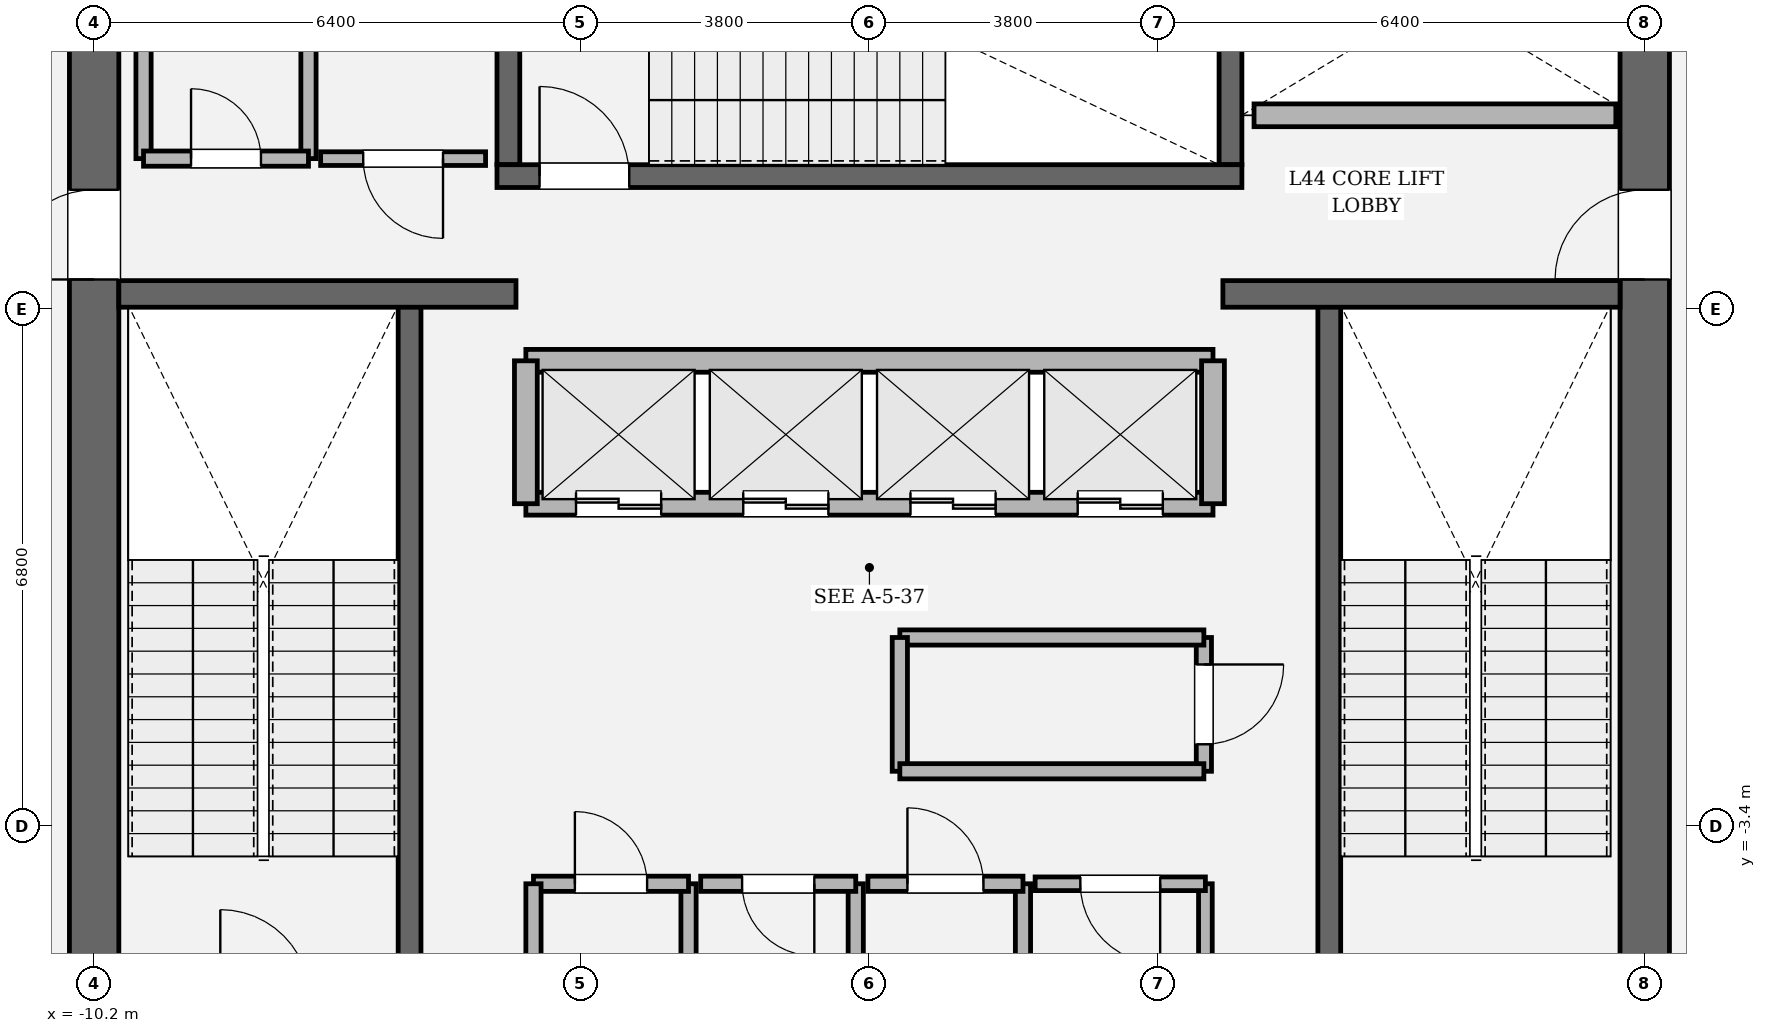
"""IFC4 building model, lengths in metres.
Left out: names, types, materials, properties, quantities, classifications, styles, units other than length and angle.
Written with IfcOpenShell. Run it as: python <this file> out.ifc"""

import sys

from ifc_helpers import new_model, si_unit, direction, frame, frame_2d, origin, place, context, subcontext, project, spatial, rectangle, extrude, element, fill, save


model = new_model("IFC4")
c1 = context("Model", 3, precision=1e-05, world=origin(), true_north=direction((0.0, 1.0)))
c2 = subcontext(c1, "Body", "Model", "MODEL_VIEW")
j1 = project(units=[si_unit("LENGTHUNIT", "METRE"), si_unit("PLANEANGLEUNIT", "RADIAN")], contexts=[c1])
p1 = place(None, origin())
s1 = spatial("IfcSite", under=j1, at=p1, CompositionType="ELEMENT")
p2 = place(p1, origin())
s2 = spatial("IfcBuilding", under=s1, at=p2, CompositionType="ELEMENT")
p3 = place(p2, frame((0.0, 0.0, 188.4)))
s3 = spatial("IfcBuildingStorey", under=s2, at=p3, CompositionType="ELEMENT", Elevation=188.4)
p4 = place(p3, frame((-10.2, -8.875, 0.0), z_axis=(0.0, 0.0, 1.0), x_axis=(0.0, 1.0, 0.0)))
e1 = element("IfcWall", 1, at=p4, inside=s3, PredefinedType="SHEAR", context=c2, shape_type="SweptSolid", body=[
    extrude(rectangle(XDim=17.75, YDim=0.65, at=frame_2d((8.875, 0.0))), origin(), (0.0, 0.0, 1.0), 4.05),
])
p5 = place(p4, frame((12.665, 0.0, 0.0)))
e2 = element("IfcOpeningElement", 2, at=p5, cuts=e1, PredefinedType="OPENING", context=c2, shape_type="SweptSolid", body=[
    extrude(rectangle(XDim=1.18, YDim=2.2, at=frame_2d((0.59, 1.1))), frame((0.0, 0.335, 0.0), z_axis=(0.0, -1.0, 0.0), x_axis=(1.0, 0.0, 0.0)), (0.0, 0.0, 1.0), 0.67),
])
p6 = place(p3, frame((10.2, 8.875, 0.0), z_axis=(0.0, 0.0, 1.0), x_axis=(0.0, -1.0, 0.0)))
e3 = element("IfcWall", 3, at=p6, inside=s3, PredefinedType="SHEAR", context=c2, shape_type="SweptSolid", body=[
    extrude(rectangle(XDim=17.75, YDim=0.65, at=frame_2d((8.875, 0.0))), origin(), (0.0, 0.0, 1.0), 4.05),
])
p7 = place(p6, frame((3.905, 0.0, 0.0)))
e4 = element("IfcOpeningElement", 4, at=p7, cuts=e3, PredefinedType="OPENING", context=c2, shape_type="SweptSolid", body=[
    extrude(rectangle(XDim=1.18, YDim=2.2, at=frame_2d((0.59, 1.1))), frame((0.0, 0.335, 0.0), z_axis=(0.0, -1.0, 0.0), x_axis=(1.0, 0.0, 0.0)), (0.0, 0.0, 1.0), 0.67),
])
for number, where, z_axis, x_axis in (
    (5, (-6.05, -5.5, 0.0), (0.0, 0.0, 1.0), (0.0, 1.0, 0.0)),
    (6, (6.05, 3.45, 0.0), (0.0, 0.0, 1.0), (0.0, -1.0, 0.0)),
):
    element("IfcWall", number, at=place(p3, frame(where, z_axis=z_axis, x_axis=x_axis)), inside=s3, PredefinedType="SOLIDWALL", context=c2, shape_type="SweptSolid", body=[
        extrude(rectangle(XDim=8.95, YDim=0.3, at=frame_2d((4.475, 0.0))), origin(), (0.0, 0.0, 1.0), 4.05),
    ])
for number, where, z_axis, x_axis in (
    (7, (-4.75, 5.3, 0.0), (0.0, 0.0, 1.0), (0.0, 1.0, 0.0)),
    (8, (4.75, 8.875, 0.0), (0.0, 0.0, 1.0), (0.0, -1.0, 0.0)),
):
    element("IfcWall", number, at=place(p3, frame(where, z_axis=z_axis, x_axis=x_axis)), inside=s3, PredefinedType="SOLIDWALL", context=c2, shape_type="SweptSolid", body=[
        extrude(rectangle(XDim=3.575, YDim=0.3, at=frame_2d((1.788, 0.0))), origin(), (0.0, 0.0, 1.0), 4.05),
    ])
p8 = place(p3, frame((-4.9, 5.15, 0.0), z_axis=(0.0, 0.0, 1.0), x_axis=(1.0, 0.0, 0.0)))
e9 = element("IfcWall", 9, at=p8, inside=s3, PredefinedType="SOLIDWALL", context=c2, shape_type="SweptSolid", body=[
    extrude(rectangle(XDim=9.8, YDim=0.3, at=frame_2d((4.9, 0.0))), origin(), (0.0, 0.0, 1.0), 4.05),
])
p9 = place(p8, frame((0.56, 0.0, 0.0)))
e10 = element("IfcOpeningElement", 10, at=p9, cuts=e9, PredefinedType="OPENING", context=c2, shape_type="SweptSolid", body=[
    extrude(rectangle(XDim=1.18, YDim=2.2, at=frame_2d((0.59, 1.1))), frame((0.0, 0.16, 0.0), z_axis=(0.0, -1.0, 0.0), x_axis=(1.0, 0.0, 0.0)), (0.0, 0.0, 1.0), 0.32),
])
for number, where, z_axis, x_axis in (
    (11, (-9.875, 3.6, 0.0), (0.0, 0.0, 1.0), (1.0, 0.0, 0.0)),
    (12, (4.65, 3.6, 0.0), (0.0, 0.0, 1.0), (1.0, 0.0, 0.0)),
):
    element("IfcWall", number, at=place(p3, frame(where, z_axis=z_axis, x_axis=x_axis)), inside=s3, PredefinedType="SOLIDWALL", context=c2, shape_type="SweptSolid", body=[
        extrude(rectangle(XDim=5.225, YDim=0.35, at=frame_2d((2.613, 0.0))), origin(), (0.0, 0.0, 1.0), 4.05),
    ])
p10 = place(p3, frame((-4.52, 0.84, 0.0), z_axis=(0.0, 0.0, 1.0), x_axis=(1.0, 0.0, 0.0)))
e13 = element("IfcWall", 13, at=p10, inside=s3, PredefinedType="SOLIDWALL", context=c2, shape_type="SweptSolid", body=[
    extrude(rectangle(XDim=9.04, YDim=0.3, at=frame_2d((4.52, 0.0))), origin(), (0.0, 0.0, 1.0), 3.83),
])
p11 = place(p10, frame((0.66, 0.0, 0.0)))
e14 = element("IfcOpeningElement", 14, at=p11, cuts=e13, PredefinedType="OPENING", context=c2, shape_type="SweptSolid", body=[
    extrude(rectangle(XDim=1.12, YDim=2.25, at=frame_2d((0.56, 1.125))), frame((0.0, 0.16, 0.0), z_axis=(0.0, -1.0, 0.0), x_axis=(1.0, 0.0, 0.0)), (0.0, 0.0, 1.0), 0.32),
])
p12 = place(p10, frame((2.86, 0.0, 0.0)))
e15 = element("IfcOpeningElement", 15, at=p12, cuts=e13, PredefinedType="OPENING", context=c2, shape_type="SweptSolid", body=[
    extrude(rectangle(XDim=1.12, YDim=2.25, at=frame_2d((0.56, 1.125))), frame((0.0, 0.16, 0.0), z_axis=(0.0, -1.0, 0.0), x_axis=(1.0, 0.0, 0.0)), (0.0, 0.0, 1.0), 0.32),
])
p13 = place(p10, frame((5.06, 0.0, 0.0)))
e16 = element("IfcOpeningElement", 16, at=p13, cuts=e13, PredefinedType="OPENING", context=c2, shape_type="SweptSolid", body=[
    extrude(rectangle(XDim=1.12, YDim=2.25, at=frame_2d((0.56, 1.125))), frame((0.0, 0.16, 0.0), z_axis=(0.0, -1.0, 0.0), x_axis=(1.0, 0.0, 0.0)), (0.0, 0.0, 1.0), 0.32),
])
p14 = place(p10, frame((7.26, 0.0, 0.0)))
e17 = element("IfcOpeningElement", 17, at=p14, cuts=e13, PredefinedType="OPENING", context=c2, shape_type="SweptSolid", body=[
    extrude(rectangle(XDim=1.12, YDim=2.25, at=frame_2d((0.56, 1.125))), frame((0.0, 0.16, 0.0), z_axis=(0.0, -1.0, 0.0), x_axis=(1.0, 0.0, 0.0)), (0.0, 0.0, 1.0), 0.32),
])
p15 = place(p3, frame((-4.52, 2.72, 0.0), z_axis=(0.0, 0.0, 1.0), x_axis=(1.0, 0.0, 0.0)))
e18 = element("IfcWall", 18, at=p15, inside=s3, PredefinedType="SOLIDWALL", context=c2, shape_type="SweptSolid", body=[
    extrude(rectangle(XDim=9.04, YDim=0.3, at=frame_2d((4.52, 0.0))), origin(), (0.0, 0.0, 1.0), 3.83),
])
for number, where, z_axis, x_axis in (
    (19, (-4.52, 0.84, 0.0), (0.0, 0.0, 1.0), (0.0, 1.0, 0.0)),
    (20, (4.52, 0.84, 0.0), (0.0, 0.0, 1.0), (0.0, 1.0, 0.0)),
):
    element("IfcWall", number, at=place(p3, frame(where, z_axis=z_axis, x_axis=x_axis)), inside=s3, PredefinedType="SOLIDWALL", context=c2, shape_type="SweptSolid", body=[
        extrude(rectangle(XDim=1.88, YDim=0.3, at=frame_2d((0.94, 0.0))), origin(), (0.0, 0.0, 1.0), 3.83),
    ])
p16 = place(p3, frame((5.06, 5.95, 0.0), z_axis=(0.0, 0.0, 1.0), x_axis=(1.0, 0.0, 0.0)))
e21 = element("IfcWall", 21, at=p16, inside=s3, PredefinedType="SOLIDWALL", context=c2, shape_type="SweptSolid", body=[
    extrude(rectangle(XDim=4.76, YDim=0.3, at=frame_2d((2.38, 0.0))), origin(), (0.0, 0.0, 1.0), 3.83),
])
p17 = place(p3, frame((-2.38, -5.9, 0.0), z_axis=(0.0, 0.0, 1.0), x_axis=(0.0, 1.0, 0.0)))
e22 = element("IfcWall", 22, at=p17, inside=s3, PredefinedType="SOLIDWALL", context=c2, shape_type="SweptSolid", body=[
    extrude(rectangle(XDim=1.74, YDim=0.2, at=frame_2d((0.87, 0.0))), origin(), (0.0, 0.0, 1.0), 3.83),
])
p18 = place(p3, frame((-2.38, -4.16, 0.0), z_axis=(0.0, 0.0, 1.0), x_axis=(-1.0, 0.0, 0.0)))
e23 = element("IfcWall", 23, at=p18, inside=s3, PredefinedType="SOLIDWALL", context=c2, shape_type="SweptSolid", body=[
    extrude(rectangle(XDim=2.04, YDim=0.2, at=frame_2d((1.02, 0.0))), origin(), (0.0, 0.0, 1.0), 3.83),
])
p19 = place(p18, frame((0.545, 0.0, 0.0)))
e24 = element("IfcOpeningElement", 24, at=p19, cuts=e23, PredefinedType="OPENING", context=c2, shape_type="SweptSolid", body=[
    extrude(rectangle(XDim=0.95, YDim=2.15, at=frame_2d((0.475, 1.075))), frame((0.0, 0.11, 0.0), z_axis=(0.0, -1.0, 0.0), x_axis=(1.0, 0.0, 0.0)), (0.0, 0.0, 1.0), 0.22),
])
for number, where, z_axis, x_axis in (
    (25, (-4.42, -4.16, 0.0), (0.0, 0.0, 1.0), (0.0, -1.0, 0.0)),
    (26, (-0.18, -5.9, 0.0), (0.0, 0.0, 1.0), (0.0, 1.0, 0.0)),
):
    element("IfcWall", number, at=place(p3, frame(where, z_axis=z_axis, x_axis=x_axis)), inside=s3, PredefinedType="SOLIDWALL", context=c2, shape_type="SweptSolid", body=[
        extrude(rectangle(XDim=1.74, YDim=0.2, at=frame_2d((0.87, 0.0))), origin(), (0.0, 0.0, 1.0), 3.83),
    ])
p20 = place(p3, frame((-0.18, -4.16, 0.0), z_axis=(0.0, 0.0, 1.0), x_axis=(-1.0, 0.0, 0.0)))
e27 = element("IfcWall", 27, at=p20, inside=s3, PredefinedType="SOLIDWALL", context=c2, shape_type="SweptSolid", body=[
    extrude(rectangle(XDim=2.04, YDim=0.2, at=frame_2d((1.02, 0.0))), origin(), (0.0, 0.0, 1.0), 3.83),
])
p21 = place(p20, frame((0.545, 0.0, 0.0)))
e28 = element("IfcOpeningElement", 28, at=p21, cuts=e27, PredefinedType="OPENING", context=c2, shape_type="SweptSolid", body=[
    extrude(rectangle(XDim=0.95, YDim=2.15, at=frame_2d((0.475, 1.075))), frame((0.0, 0.11, 0.0), z_axis=(0.0, -1.0, 0.0), x_axis=(1.0, 0.0, 0.0)), (0.0, 0.0, 1.0), 0.22),
])
p22 = place(p3, frame((2.02, -5.9, 0.0), z_axis=(0.0, 0.0, 1.0), x_axis=(0.0, 1.0, 0.0)))
e29 = element("IfcWall", 29, at=p22, inside=s3, PredefinedType="SOLIDWALL", context=c2, shape_type="SweptSolid", body=[
    extrude(rectangle(XDim=1.74, YDim=0.2, at=frame_2d((0.87, 0.0))), origin(), (0.0, 0.0, 1.0), 3.83),
])
p23 = place(p3, frame((2.02, -4.16, 0.0), z_axis=(0.0, 0.0, 1.0), x_axis=(-1.0, 0.0, 0.0)))
e30 = element("IfcWall", 30, at=p23, inside=s3, PredefinedType="SOLIDWALL", context=c2, shape_type="SweptSolid", body=[
    extrude(rectangle(XDim=2.04, YDim=0.2, at=frame_2d((1.02, 0.0))), origin(), (0.0, 0.0, 1.0), 3.83),
])
p24 = place(p23, frame((0.52, 0.0, 0.0)))
e31 = element("IfcOpeningElement", 31, at=p24, cuts=e30, PredefinedType="OPENING", context=c2, shape_type="SweptSolid", body=[
    extrude(rectangle(XDim=1.0, YDim=2.15, at=frame_2d((0.5, 1.075))), frame((0.0, 0.11, 0.0), z_axis=(0.0, -1.0, 0.0), x_axis=(1.0, 0.0, 0.0)), (0.0, 0.0, 1.0), 0.22),
])
p25 = place(p3, frame((4.42, -5.9, 0.0), z_axis=(0.0, 0.0, 1.0), x_axis=(0.0, 1.0, 0.0)))
e32 = element("IfcWall", 32, at=p25, inside=s3, PredefinedType="PARTITIONING", context=c2, shape_type="SweptSolid", body=[
    extrude(rectangle(XDim=1.74, YDim=0.18, at=frame_2d((0.87, 0.0))), origin(), (0.0, 0.0, 1.0), 3.83),
])
p26 = place(p3, frame((4.42, -4.16, 0.0), z_axis=(0.0, 0.0, 1.0), x_axis=(-1.0, 0.0, 0.0)))
e33 = element("IfcWall", 33, at=p26, inside=s3, PredefinedType="PARTITIONING", context=c2, shape_type="SweptSolid", body=[
    extrude(rectangle(XDim=2.24, YDim=0.18, at=frame_2d((1.12, 0.0))), origin(), (0.0, 0.0, 1.0), 3.83),
])
p27 = place(p26, frame((0.595, 0.0, 0.0)))
e34 = element("IfcOpeningElement", 34, at=p27, cuts=e33, PredefinedType="OPENING", context=c2, shape_type="SweptSolid", body=[
    extrude(rectangle(XDim=1.05, YDim=2.2, at=frame_2d((0.525, 1.1))), frame((0.0, 0.1, 0.0), z_axis=(0.0, -1.0, 0.0), x_axis=(1.0, 0.0, 0.0)), (0.0, 0.0, 1.0), 0.2),
])
p28 = place(p3, frame((4.4, -2.68, 0.0), z_axis=(0.0, 0.0, 1.0), x_axis=(0.0, 1.0, 0.0)))
e35 = element("IfcWall", 35, at=p28, inside=s3, PredefinedType="SOLIDWALL", context=c2, shape_type="SweptSolid", body=[
    extrude(rectangle(XDim=1.76, YDim=0.2, at=frame_2d((0.88, 0.0))), origin(), (0.0, 0.0, 1.0), 3.83),
])
p29 = place(p28, frame((0.355, 0.0, 0.0)))
e36 = element("IfcOpeningElement", 36, at=p29, cuts=e35, PredefinedType="OPENING", context=c2, shape_type="SweptSolid", body=[
    extrude(rectangle(XDim=1.05, YDim=2.2, at=frame_2d((0.525, 1.1))), frame((0.0, 0.11, 0.0), z_axis=(0.0, -1.0, 0.0), x_axis=(1.0, 0.0, 0.0)), (0.0, 0.0, 1.0), 0.22),
])
p30 = place(p3, frame((4.4, -0.92, 0.0), z_axis=(0.0, 0.0, 1.0), x_axis=(-1.0, 0.0, 0.0)))
e37 = element("IfcWall", 37, at=p30, inside=s3, PredefinedType="SOLIDWALL", context=c2, shape_type="SweptSolid", body=[
    extrude(rectangle(XDim=4.0, YDim=0.2, at=frame_2d((2.0, 0.0))), origin(), (0.0, 0.0, 1.0), 3.83),
])
p31 = place(p3, frame((0.4, -0.92, 0.0), z_axis=(0.0, 0.0, 1.0), x_axis=(0.0, -1.0, 0.0)))
e38 = element("IfcWall", 38, at=p31, inside=s3, PredefinedType="SOLIDWALL", context=c2, shape_type="SweptSolid", body=[
    extrude(rectangle(XDim=1.76, YDim=0.2, at=frame_2d((0.88, 0.0))), origin(), (0.0, 0.0, 1.0), 3.83),
])
p32 = place(p3, frame((0.4, -2.68, 0.0), z_axis=(0.0, 0.0, 1.0), x_axis=(1.0, 0.0, 0.0)))
e39 = element("IfcWall", 39, at=p32, inside=s3, PredefinedType="SOLIDWALL", context=c2, shape_type="SweptSolid", body=[
    extrude(rectangle(XDim=4.0, YDim=0.2, at=frame_2d((2.0, 0.0))), origin(), (0.0, 0.0, 1.0), 3.83),
])
for number, where, z_axis, x_axis in (
    (40, (-7.38, 5.38, 0.0), (0.0, 0.0, 1.0), (0.0, 1.0, 0.0)),
    (41, (-9.55, 8.65, 0.0), (0.0, 0.0, 1.0), (0.0, -1.0, 0.0)),
):
    element("IfcWall", number, at=place(p3, frame(where, z_axis=z_axis, x_axis=x_axis)), inside=s3, PredefinedType="SOLIDWALL", context=c2, shape_type="SweptSolid", body=[
        extrude(rectangle(XDim=3.27, YDim=0.2, at=frame_2d((1.635, 0.0))), origin(), (0.0, 0.0, 1.0), 3.83),
    ])
p33 = place(p3, frame((-9.55, 5.38, 0.0), z_axis=(0.0, 0.0, 1.0), x_axis=(1.0, 0.0, 0.0)))
e42 = element("IfcWall", 42, at=p33, inside=s3, PredefinedType="SOLIDWALL", context=c2, shape_type="SweptSolid", body=[
    extrude(rectangle(XDim=2.17, YDim=0.2, at=frame_2d((1.085, 0.0))), origin(), (0.0, 0.0, 1.0), 3.83),
])
p34 = place(p33, frame((0.625, 0.0, 0.0)))
e43 = element("IfcOpeningElement", 43, at=p34, cuts=e42, PredefinedType="OPENING", context=c2, shape_type="SweptSolid", body=[
    extrude(rectangle(XDim=0.92, YDim=2.1, at=frame_2d((0.46, 1.05))), frame((0.0, 0.11, 0.0), z_axis=(0.0, -1.0, 0.0), x_axis=(1.0, 0.0, 0.0)), (0.0, 0.0, 1.0), 0.22),
])
p35 = place(p3, frame((-7.22, 5.38, 0.0), z_axis=(0.0, 0.0, 1.0), x_axis=(1.0, 0.0, 0.0)))
e44 = element("IfcWall", 44, at=p35, inside=s3, PredefinedType="PARTITIONING", context=c2, shape_type="SweptSolid", body=[
    extrude(rectangle(XDim=2.17, YDim=0.18, at=frame_2d((1.085, 0.0))), origin(), (0.0, 0.0, 1.0), 3.83),
])
p36 = place(p35, frame((0.56, 0.0, 0.0)))
e45 = element("IfcOpeningElement", 45, at=p36, cuts=e44, PredefinedType="OPENING", context=c2, shape_type="SweptSolid", body=[
    extrude(rectangle(XDim=1.05, YDim=2.2, at=frame_2d((0.525, 1.1))), frame((0.0, 0.1, 0.0), z_axis=(0.0, -1.0, 0.0), x_axis=(1.0, 0.0, 0.0)), (0.0, 0.0, 1.0), 0.2),
])
p37 = place(p9, origin())
e46 = element("IfcDoor", 46, at=p37, inside=s3, OperationType="SINGLE_SWING_LEFT", PredefinedType="DOOR", context=c2, shape_type="SweptSolid", body=[
    extrude(rectangle(XDim=1.18, YDim=2.2, at=frame_2d((0.59, 1.1))), frame((0.0, 0.025, 0.0), z_axis=(0.0, -1.0, 0.0), x_axis=(1.0, 0.0, 0.0)), (0.0, 0.0, 1.0), 0.05),
])
fill(e10, e46)
p38 = place(p5, origin())
e47 = element("IfcDoor", 47, at=p38, inside=s3, OperationType="SINGLE_SWING_LEFT", PredefinedType="DOOR", context=c2, shape_type="SweptSolid", body=[
    extrude(rectangle(XDim=1.18, YDim=2.2, at=frame_2d((0.59, 1.1))), frame((0.0, 0.025, 0.0), z_axis=(0.0, -1.0, 0.0), x_axis=(1.0, 0.0, 0.0)), (0.0, 0.0, 1.0), 0.05),
])
fill(e2, e47)
p39 = place(p7, origin())
e48 = element("IfcDoor", 48, at=p39, inside=s3, OperationType="SINGLE_SWING_RIGHT", PredefinedType="DOOR", context=c2, shape_type="SweptSolid", body=[
    extrude(rectangle(XDim=1.18, YDim=2.2, at=frame_2d((0.59, 1.1))), frame((0.0, 0.025, 0.0), z_axis=(0.0, -1.0, 0.0), x_axis=(1.0, 0.0, 0.0)), (0.0, 0.0, 1.0), 0.05),
])
fill(e4, e48)
p40 = place(p11, origin())
e49 = element("IfcDoor", 49, at=p40, inside=s3, OperationType="DOUBLE_DOOR_SLIDING", PredefinedType="DOOR", context=c2, shape_type="SweptSolid", body=[
    extrude(rectangle(XDim=1.12, YDim=2.25, at=frame_2d((0.56, 1.125))), frame((0.0, 0.025, 0.0), z_axis=(0.0, -1.0, 0.0), x_axis=(1.0, 0.0, 0.0)), (0.0, 0.0, 1.0), 0.05),
])
fill(e14, e49)
p41 = place(p12, origin())
e50 = element("IfcDoor", 50, at=p41, inside=s3, OperationType="DOUBLE_DOOR_SLIDING", PredefinedType="DOOR", context=c2, shape_type="SweptSolid", body=[
    extrude(rectangle(XDim=1.12, YDim=2.25, at=frame_2d((0.56, 1.125))), frame((0.0, 0.025, 0.0), z_axis=(0.0, -1.0, 0.0), x_axis=(1.0, 0.0, 0.0)), (0.0, 0.0, 1.0), 0.05),
])
fill(e15, e50)
p42 = place(p13, origin())
e51 = element("IfcDoor", 51, at=p42, inside=s3, OperationType="DOUBLE_DOOR_SLIDING", PredefinedType="DOOR", context=c2, shape_type="SweptSolid", body=[
    extrude(rectangle(XDim=1.12, YDim=2.25, at=frame_2d((0.56, 1.125))), frame((0.0, 0.025, 0.0), z_axis=(0.0, -1.0, 0.0), x_axis=(1.0, 0.0, 0.0)), (0.0, 0.0, 1.0), 0.05),
])
fill(e16, e51)
p43 = place(p14, origin())
e52 = element("IfcDoor", 52, at=p43, inside=s3, OperationType="DOUBLE_DOOR_SLIDING", PredefinedType="DOOR", context=c2, shape_type="SweptSolid", body=[
    extrude(rectangle(XDim=1.12, YDim=2.25, at=frame_2d((0.56, 1.125))), frame((0.0, 0.025, 0.0), z_axis=(0.0, -1.0, 0.0), x_axis=(1.0, 0.0, 0.0)), (0.0, 0.0, 1.0), 0.05),
])
fill(e17, e52)
p44 = place(p19, origin())
e53 = element("IfcDoor", 53, at=p44, inside=s3, OperationType="SINGLE_SWING_RIGHT", PredefinedType="DOOR", context=c2, shape_type="SweptSolid", body=[
    extrude(rectangle(XDim=0.95, YDim=2.15, at=frame_2d((0.475, 1.075))), frame((0.0, 0.025, 0.0), z_axis=(0.0, -1.0, 0.0), x_axis=(1.0, 0.0, 0.0)), (0.0, 0.0, 1.0), 0.05),
])
fill(e24, e53)
p45 = place(p21, origin())
e54 = element("IfcDoor", 54, at=p45, inside=s3, OperationType="SINGLE_SWING_LEFT", PredefinedType="DOOR", context=c2, shape_type="SweptSolid", body=[
    extrude(rectangle(XDim=0.95, YDim=2.15, at=frame_2d((0.475, 1.075))), frame((0.0, 0.025, 0.0), z_axis=(0.0, -1.0, 0.0), x_axis=(1.0, 0.0, 0.0)), (0.0, 0.0, 1.0), 0.05),
])
fill(e28, e54)
p46 = place(p24, origin())
e55 = element("IfcDoor", 55, at=p46, inside=s3, OperationType="SINGLE_SWING_RIGHT", PredefinedType="DOOR", context=c2, shape_type="SweptSolid", body=[
    extrude(rectangle(XDim=1.0, YDim=2.15, at=frame_2d((0.5, 1.075))), frame((0.0, 0.025, 0.0), z_axis=(0.0, -1.0, 0.0), x_axis=(1.0, 0.0, 0.0)), (0.0, 0.0, 1.0), 0.05),
])
fill(e31, e55)
p47 = place(p27, origin())
e56 = element("IfcDoor", 56, at=p47, inside=s3, OperationType="SINGLE_SWING_LEFT", PredefinedType="DOOR", context=c2, shape_type="SweptSolid", body=[
    extrude(rectangle(XDim=1.05, YDim=2.2, at=frame_2d((0.525, 1.1))), frame((0.0, 0.025, 0.0), z_axis=(0.0, -1.0, 0.0), x_axis=(1.0, 0.0, 0.0)), (0.0, 0.0, 1.0), 0.05),
])
fill(e34, e56)
p48 = place(p29, origin())
e57 = element("IfcDoor", 57, at=p48, inside=s3, OperationType="SINGLE_SWING_RIGHT", PredefinedType="DOOR", context=c2, shape_type="SweptSolid", body=[
    extrude(rectangle(XDim=1.05, YDim=2.2, at=frame_2d((0.525, 1.1))), frame((0.0, 0.025, 0.0), z_axis=(0.0, -1.0, 0.0), x_axis=(1.0, 0.0, 0.0)), (0.0, 0.0, 1.0), 0.05),
])
fill(e36, e57)
p49 = place(p34, origin())
e58 = element("IfcDoor", 58, at=p49, inside=s3, OperationType="SINGLE_SWING_LEFT", PredefinedType="DOOR", context=c2, shape_type="SweptSolid", body=[
    extrude(rectangle(XDim=0.92, YDim=2.1, at=frame_2d((0.46, 1.05))), frame((0.0, 0.025, 0.0), z_axis=(0.0, -1.0, 0.0), x_axis=(1.0, 0.0, 0.0)), (0.0, 0.0, 1.0), 0.05),
])
fill(e43, e58)
p50 = place(p36, origin())
e59 = element("IfcDoor", 59, at=p50, inside=s3, OperationType="SINGLE_SWING_RIGHT", PredefinedType="DOOR", context=c2, shape_type="SweptSolid", body=[
    extrude(rectangle(XDim=1.05, YDim=2.2, at=frame_2d((0.525, 1.1))), frame((0.0, 0.025, 0.0), z_axis=(0.0, -1.0, 0.0), x_axis=(1.0, 0.0, 0.0)), (0.0, 0.0, 1.0), 0.05),
])
fill(e45, e59)
save(model, sys.argv[1])
